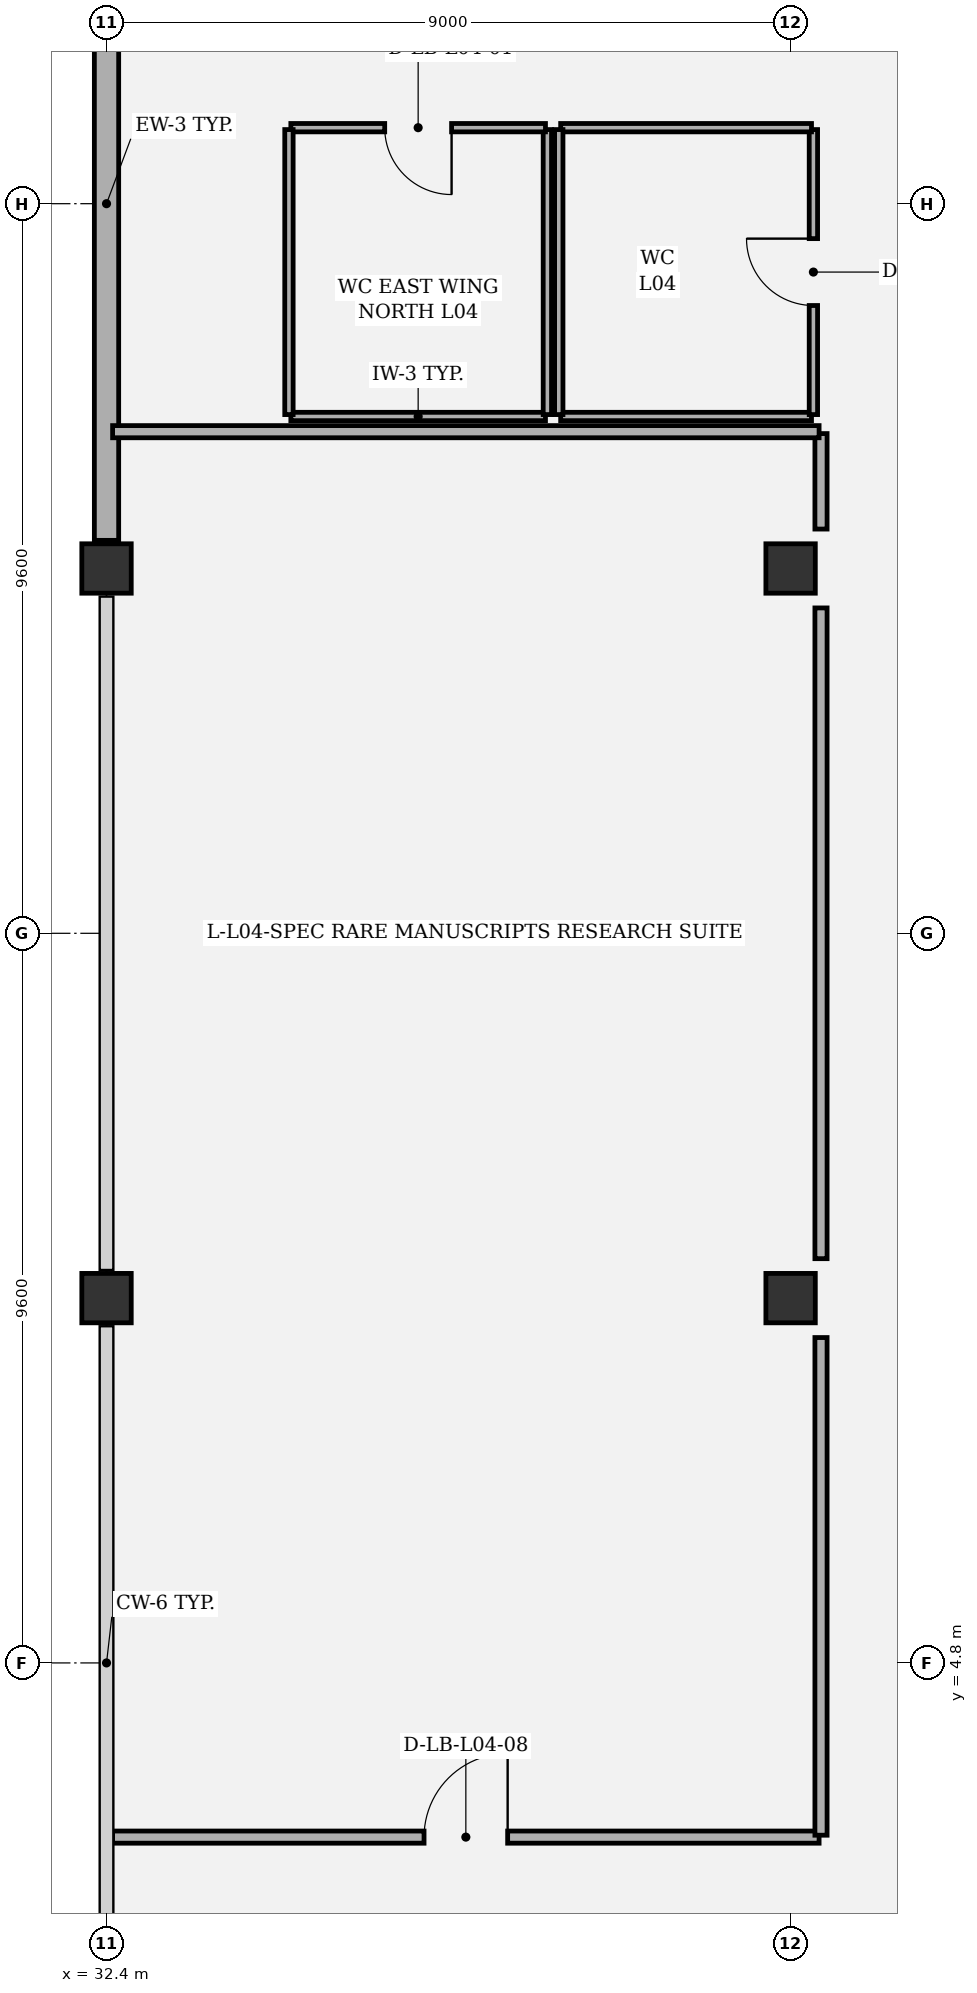
"""IFC4 building model, lengths in metres.
Left out: names, types, materials, properties, quantities, classifications, styles, units other than length and angle.
Written with IfcOpenShell. Run it as: python <this file> out.ifc"""

import sys

from ifc_helpers import new_model, si_unit, direction, frame, frame_2d, origin, origin_2d, place, context, subcontext, project, spatial, rectangle, extrude, element, fill, save


model = new_model("IFC4")
c1 = context("Model", 3, precision=1e-05, world=origin(), true_north=direction((0.0, 1.0)))
c2 = subcontext(c1, "Body", "Model", "MODEL_VIEW")
j1 = project(units=[si_unit("LENGTHUNIT", "METRE"), si_unit("PLANEANGLEUNIT", "RADIAN")], contexts=[c1])
p1 = place(None, origin())
s1 = spatial("IfcSite", under=j1, at=p1, CompositionType="ELEMENT")
p2 = place(p1, origin())
s2 = spatial("IfcBuilding", under=s1, at=p2, CompositionType="ELEMENT")
p3 = place(p2, frame((0.0, 0.0, 22.0)))
s3 = spatial("IfcBuildingStorey", under=s2, at=p3, CompositionType="ELEMENT", Elevation=22.0)
p4 = place(p3, frame((32.4, 9.6, 0.0), z_axis=(0.0, 0.0, 1.0), x_axis=(1.0, 0.0, 0.0)))
e1 = element("IfcColumn", 1, at=p4, inside=s3, PredefinedType="COLUMN", context=c2, shape_type="SweptSolid", body=[
    extrude(rectangle(XDim=0.65, YDim=0.65, at=origin_2d()), origin(), (0.0, 0.0, 1.0), 7.094),
])
p5 = place(p3, frame((32.4, 19.2, 0.0), z_axis=(0.0, 0.0, 1.0), x_axis=(1.0, 0.0, 0.0)))
e2 = element("IfcColumn", 2, at=p5, inside=s3, PredefinedType="COLUMN", context=c2, shape_type="SweptSolid", body=[
    extrude(rectangle(XDim=0.65, YDim=0.65, at=origin_2d()), origin(), (0.0, 0.0, 1.0), 5.0),
])
p6 = place(p3, frame((41.4, 9.6, 0.0), z_axis=(0.0, 0.0, 1.0), x_axis=(1.0, 0.0, 0.0)))
e3 = element("IfcColumn", 3, at=p6, inside=s3, PredefinedType="COLUMN", context=c2, shape_type="SweptSolid", body=[
    extrude(rectangle(XDim=0.65, YDim=0.65, at=origin_2d()), origin(), (0.0, 0.0, 1.0), 7.094),
])
p7 = place(p3, frame((41.4, 19.2, 0.0), z_axis=(0.0, 0.0, 1.0), x_axis=(1.0, 0.0, 0.0)))
e4 = element("IfcColumn", 4, at=p7, inside=s3, PredefinedType="COLUMN", context=c2, shape_type="SweptSolid", body=[
    extrude(rectangle(XDim=0.65, YDim=0.65, at=origin_2d()), origin(), (0.0, 0.0, 1.0), 5.0),
])
p8 = place(p3, frame((32.4, 19.57, 0.0), z_axis=(0.0, 0.0, 1.0), x_axis=(0.0, 1.0, 0.0)))
e5 = element("IfcWall", 5, at=p8, inside=s3, PredefinedType="SOLIDWALL", context=c2, shape_type="SweptSolid", body=[
    extrude(rectangle(XDim=8.86, YDim=0.32, at=frame_2d((4.43, 0.0))), origin(), (0.0, 0.0, 1.0), 4.7),
])
p9 = place(p3, frame((34.825, 21.2, 0.0), z_axis=(0.0, 0.0, 1.0), x_axis=(1.0, 0.0, 0.0)))
e6 = element("IfcWall", 6, at=p9, inside=s3, PredefinedType="PARTITIONING", context=c2, shape_type="SweptSolid", body=[
    extrude(rectangle(XDim=3.35, YDim=0.11, at=frame_2d((1.675, 0.0))), origin(), (0.0, 0.0, 1.0), 4.7),
])
p10 = place(p3, frame((38.2, 21.225, 0.0), z_axis=(0.0, 0.0, 1.0), x_axis=(0.0, 1.0, 0.0)))
e7 = element("IfcWall", 7, at=p10, inside=s3, PredefinedType="PARTITIONING", context=c2, shape_type="SweptSolid", body=[
    extrude(rectangle(XDim=3.75, YDim=0.11, at=frame_2d((1.875, 0.0))), origin(), (0.0, 0.0, 1.0), 4.7),
])
p11 = place(p3, frame((38.175, 25.0, 0.0), z_axis=(0.0, 0.0, 1.0), x_axis=(-1.0, 0.0, 0.0)))
e8 = element("IfcWall", 8, at=p11, inside=s3, PredefinedType="PARTITIONING", context=c2, shape_type="SweptSolid", body=[
    extrude(rectangle(XDim=3.35, YDim=0.11, at=frame_2d((1.675, 0.0))), origin(), (0.0, 0.0, 1.0), 4.7),
])
p12 = place(p11, frame((1.235, 0.0, 0.0)))
e9 = element("IfcOpeningElement", 9, at=p12, cuts=e8, PredefinedType="OPENING", context=c2, shape_type="SweptSolid", body=[
    extrude(rectangle(XDim=0.88, YDim=2.1, at=frame_2d((0.44, 1.05))), frame((0.0, 0.065, 0.0), z_axis=(0.0, -1.0, 0.0), x_axis=(1.0, 0.0, 0.0)), (0.0, 0.0, 1.0), 0.13),
])
p13 = place(p3, frame((34.8, 24.975, 0.0), z_axis=(0.0, 0.0, 1.0), x_axis=(0.0, -1.0, 0.0)))
e10 = element("IfcWall", 10, at=p13, inside=s3, PredefinedType="PARTITIONING", context=c2, shape_type="SweptSolid", body=[
    extrude(rectangle(XDim=3.75, YDim=0.11, at=frame_2d((1.875, 0.0))), origin(), (0.0, 0.0, 1.0), 4.7),
])
p14 = place(p3, frame((38.375, 21.2, 0.0), z_axis=(0.0, 0.0, 1.0), x_axis=(1.0, 0.0, 0.0)))
e11 = element("IfcWall", 11, at=p14, inside=s3, PredefinedType="PARTITIONING", context=c2, shape_type="SweptSolid", body=[
    extrude(rectangle(XDim=3.3, YDim=0.11, at=frame_2d((1.65, 0.0))), origin(), (0.0, 0.0, 1.0), 4.7),
])
p15 = place(p3, frame((41.7, 21.225, 0.0), z_axis=(0.0, 0.0, 1.0), x_axis=(0.0, 1.0, 0.0)))
e12 = element("IfcWall", 12, at=p15, inside=s3, PredefinedType="PARTITIONING", context=c2, shape_type="SweptSolid", body=[
    extrude(rectangle(XDim=3.75, YDim=0.11, at=frame_2d((1.875, 0.0))), origin(), (0.0, 0.0, 1.0), 4.7),
])
p16 = place(p15, frame((1.435, 0.0, 0.0)))
e13 = element("IfcOpeningElement", 13, at=p16, cuts=e12, PredefinedType="OPENING", context=c2, shape_type="SweptSolid", body=[
    extrude(rectangle(XDim=0.88, YDim=2.1, at=frame_2d((0.44, 1.05))), frame((0.0, 0.065, 0.0), z_axis=(0.0, -1.0, 0.0), x_axis=(1.0, 0.0, 0.0)), (0.0, 0.0, 1.0), 0.13),
])
p17 = place(p3, frame((41.675, 25.0, 0.0), z_axis=(0.0, 0.0, 1.0), x_axis=(-1.0, 0.0, 0.0)))
e14 = element("IfcWall", 14, at=p17, inside=s3, PredefinedType="PARTITIONING", context=c2, shape_type="SweptSolid", body=[
    extrude(rectangle(XDim=3.3, YDim=0.11, at=frame_2d((1.65, 0.0))), origin(), (0.0, 0.0, 1.0), 4.7),
])
p18 = place(p3, frame((38.35, 24.975, 0.0), z_axis=(0.0, 0.0, 1.0), x_axis=(0.0, -1.0, 0.0)))
e15 = element("IfcWall", 15, at=p18, inside=s3, PredefinedType="PARTITIONING", context=c2, shape_type="SweptSolid", body=[
    extrude(rectangle(XDim=3.75, YDim=0.11, at=frame_2d((1.875, 0.0))), origin(), (0.0, 0.0, 1.0), 4.7),
])
p19 = place(p3, frame((32.48, 2.508, 0.0), z_axis=(0.0, 0.0, 1.0), x_axis=(1.0, 0.0, 0.0)))
e16 = element("IfcWall", 16, at=p19, inside=s3, PredefinedType="PARTITIONING", context=c2, shape_type="SweptSolid", body=[
    extrude(rectangle(XDim=9.295, YDim=0.16, at=frame_2d((4.647, 0.0))), origin(), (0.0, 0.0, 1.0), 4.7),
])
p20 = place(p19, frame((4.097, 0.0, 0.0)))
e17 = element("IfcOpeningElement", 17, at=p20, cuts=e16, PredefinedType="OPENING", context=c2, shape_type="SweptSolid", body=[
    extrude(rectangle(XDim=1.1, YDim=2.15, at=frame_2d((0.55, 1.075))), frame((0.0, 0.09, 0.0), z_axis=(0.0, -1.0, 0.0), x_axis=(1.0, 0.0, 0.0)), (0.0, 0.0, 1.0), 0.18),
])
p21 = place(p3, frame((41.8, 2.533, 0.0), z_axis=(0.0, 0.0, 1.0), x_axis=(0.0, 1.0, 0.0)))
e18 = element("IfcWall", 18, at=p21, inside=s3, PredefinedType="PARTITIONING", context=c2, shape_type="SweptSolid", body=[
    extrude(rectangle(XDim=6.548, YDim=0.16, at=frame_2d((3.274, 0.0))), origin(), (0.0, 0.0, 1.0), 4.7),
])
p22 = place(p3, frame((41.8, 10.119, 0.0), z_axis=(0.0, 0.0, 1.0), x_axis=(0.0, 1.0, 0.0)))
e19 = element("IfcWall", 19, at=p22, inside=s3, PredefinedType="PARTITIONING", context=c2, shape_type="SweptSolid", body=[
    extrude(rectangle(XDim=8.562, YDim=0.16, at=frame_2d((4.281, 0.0))), origin(), (0.0, 0.0, 1.0), 4.7),
])
p23 = place(p3, frame((41.8, 19.719, 0.0), z_axis=(0.0, 0.0, 1.0), x_axis=(0.0, 1.0, 0.0)))
e20 = element("IfcWall", 20, at=p23, inside=s3, PredefinedType="PARTITIONING", context=c2, shape_type="SweptSolid", body=[
    extrude(rectangle(XDim=1.256, YDim=0.16, at=frame_2d((0.628, 0.0))), origin(), (0.0, 0.0, 1.0), 4.7),
])
p24 = place(p3, frame((41.775, 21.0, 0.0), z_axis=(0.0, 0.0, 1.0), x_axis=(-1.0, 0.0, 0.0)))
e21 = element("IfcWall", 21, at=p24, inside=s3, PredefinedType="PARTITIONING", context=c2, shape_type="SweptSolid", body=[
    extrude(rectangle(XDim=9.295, YDim=0.16, at=frame_2d((4.647, 0.0))), origin(), (0.0, 0.0, 1.0), 4.7),
])
p25 = place(p12, origin())
e22 = element("IfcDoor", 22, at=p25, inside=s3, OperationType="SINGLE_SWING_LEFT", PredefinedType="DOOR", context=c2, shape_type="SweptSolid", body=[
    extrude(rectangle(XDim=0.88, YDim=2.1, at=frame_2d((0.44, 1.05))), frame((0.0, 0.025, 0.0), z_axis=(0.0, -1.0, 0.0), x_axis=(1.0, 0.0, 0.0)), (0.0, 0.0, 1.0), 0.05),
])
fill(e9, e22)
p26 = place(p16, origin())
e23 = element("IfcDoor", 23, at=p26, inside=s3, OperationType="SINGLE_SWING_RIGHT", PredefinedType="DOOR", context=c2, shape_type="SweptSolid", body=[
    extrude(rectangle(XDim=0.88, YDim=2.1, at=frame_2d((0.44, 1.05))), frame((0.0, 0.025, 0.0), z_axis=(0.0, -1.0, 0.0), x_axis=(1.0, 0.0, 0.0)), (0.0, 0.0, 1.0), 0.05),
])
fill(e13, e23)
p27 = place(p20, origin())
e24 = element("IfcDoor", 24, at=p27, inside=s3, OperationType="SINGLE_SWING_RIGHT", PredefinedType="DOOR", context=c2, shape_type="SweptSolid", body=[
    extrude(rectangle(XDim=1.1, YDim=2.15, at=frame_2d((0.55, 1.075))), frame((0.0, 0.025, 0.0), z_axis=(0.0, -1.0, 0.0), x_axis=(1.0, 0.0, 0.0)), (0.0, 0.0, 1.0), 0.05),
])
fill(e17, e24)
save(model, sys.argv[1])
